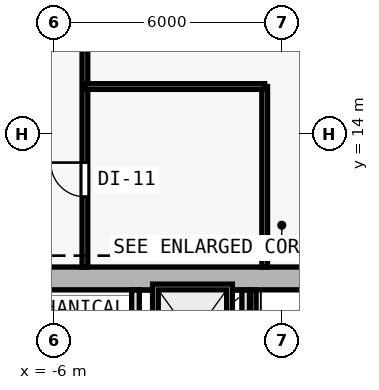
"""IFC4 building model, lengths in metres.
Left out: names, types, materials, properties, quantities, classifications, styles, units other than length and angle.
Written with IfcOpenShell. Run it as: python <this file> out.ifc"""

import sys

from ifc_helpers import new_model, si_unit, direction, frame, frame_2d, origin, place, context, subcontext, project, spatial, rectangle, extrude, element, fill, save


model = new_model("IFC4")
c1 = context("Model", 3, precision=1e-05, world=origin(), true_north=direction((0.0, 1.0)))
c2 = subcontext(c1, "Body", "Model", "MODEL_VIEW")
j1 = project(units=[si_unit("LENGTHUNIT", "METRE"), si_unit("PLANEANGLEUNIT", "RADIAN")], contexts=[c1])
p1 = place(None, origin())
s1 = spatial("IfcSite", under=j1, at=p1, CompositionType="ELEMENT")
p2 = place(p1, origin())
s2 = spatial("IfcBuilding", under=s1, at=p2, CompositionType="ELEMENT")
p3 = place(p2, frame((0.0, 0.0, 17.6)))
s3 = spatial("IfcBuildingStorey", under=s2, at=p3, CompositionType="ELEMENT", Elevation=17.6)
p4 = place(p3, frame((8.0, 10.2, 0.0), z_axis=(0.0, 0.0, 1.0), x_axis=(-1.0, 0.0, 0.0)))
e1 = element("IfcWall", 1, at=p4, inside=s3, PredefinedType="SHEAR", context=c2, shape_type="SweptSolid", body=[
    extrude(rectangle(XDim=16.0, YDim=0.6, at=frame_2d((8.0, 0.0))), origin(), (0.0, 0.0, 1.0), 3.88),
])
p5 = place(p4, frame((4.45, 0.0, 0.0)))
e2 = element("IfcOpeningElement", 2, at=p5, cuts=e1, PredefinedType="OPENING", context=c2, shape_type="SweptSolid", body=[
    extrude(rectangle(XDim=1.1, YDim=2.15, at=frame_2d((0.55, 1.075))), frame((0.0, 0.31, 0.0), z_axis=(0.0, -1.0, 0.0), x_axis=(1.0, 0.0, 0.0)), (0.0, 0.0, 1.0), 0.62),
])
p6 = place(p3, frame((-3.85, 1.35, 0.0), z_axis=(0.0, 0.0, 1.0), x_axis=(0.0, 1.0, 0.0)))
e3 = element("IfcWall", 3, at=p6, inside=s3, PredefinedType="SOLIDWALL", context=c2, shape_type="SweptSolid", body=[
    extrude(rectangle(XDim=8.545, YDim=0.2, at=frame_2d((4.272, 0.0))), origin(), (0.0, 0.0, 1.0), 3.88),
])
p7 = place(p6, frame((1.5, 0.0, 0.0)))
e4 = element("IfcOpeningElement", 4, at=p7, cuts=e3, PredefinedType="OPENING", context=c2, shape_type="SweptSolid", body=[
    extrude(rectangle(XDim=1.0, YDim=2.15, at=frame_2d((0.5, 1.075))), frame((0.0, 0.11, 0.0), z_axis=(0.0, -1.0, 0.0), x_axis=(1.0, 0.0, 0.0)), (0.0, 0.0, 1.0), 0.22),
])
p8 = place(p6, frame((3.18, 0.0, 0.0)))
e5 = element("IfcOpeningElement", 5, at=p8, cuts=e3, PredefinedType="OPENING", context=c2, shape_type="SweptSolid", body=[
    extrude(rectangle(XDim=1.0, YDim=2.15, at=frame_2d((0.5, 1.075))), frame((0.0, 0.11, 0.0), z_axis=(0.0, -1.0, 0.0), x_axis=(1.0, 0.0, 0.0)), (0.0, 0.0, 1.0), 0.22),
])
p9 = place(p3, frame((-0.95, 7.38, 0.0), z_axis=(0.0, 0.0, 1.0), x_axis=(0.0, 1.0, 0.0)))
e6 = element("IfcWall", 6, at=p9, inside=s3, PredefinedType="SOLIDWALL", context=c2, shape_type="SweptSolid", body=[
    extrude(rectangle(XDim=2.515, YDim=0.2, at=frame_2d((1.258, 0.0))), origin(), (0.0, 0.0, 1.0), 3.88),
])
p10 = place(p3, frame((-0.75, 5.92, 0.0), z_axis=(0.0, 0.0, 1.0), x_axis=(0.0, 1.0, 0.0)))
e7 = element("IfcWall", 7, at=p10, inside=s3, PredefinedType="PARTITIONING", context=c2, shape_type="SweptSolid", body=[
    extrude(rectangle(XDim=3.975, YDim=0.15, at=frame_2d((1.988, 0.0))), origin(), (0.0, 0.0, 1.0), 3.88),
])
p11 = place(p3, frame((-5.18, 10.5, 0.0), z_axis=(0.0, 0.0, 1.0), x_axis=(0.0, 1.0, 0.0)))
e8 = element("IfcWall", 8, at=p11, inside=s3, PredefinedType="PARTITIONING", context=c2, shape_type="SweptSolid", body=[
    extrude(rectangle(XDim=7.78, YDim=0.15, at=frame_2d((3.89, 0.0))), origin(), (0.0, 0.0, 1.0), 3.88),
])
p12 = place(p11, frame((1.849, 0.0, 0.0)))
e9 = element("IfcOpeningElement", 9, at=p12, cuts=e8, PredefinedType="OPENING", context=c2, shape_type="SweptSolid", body=[
    extrude(rectangle(XDim=0.9, YDim=2.1, at=frame_2d((0.45, 1.05))), frame((0.0, 0.085, 0.0), z_axis=(0.0, -1.0, 0.0), x_axis=(1.0, 0.0, 0.0)), (0.0, 0.0, 1.0), 0.17),
])
p13 = place(p3, frame((-0.45, 10.5, 0.0), z_axis=(0.0, 0.0, 1.0), x_axis=(0.0, 1.0, 0.0)))
e10 = element("IfcWall", 10, at=p13, inside=s3, PredefinedType="PARTITIONING", context=c2, shape_type="SweptSolid", body=[
    extrude(rectangle(XDim=4.75, YDim=0.15, at=frame_2d((2.375, 0.0))), origin(), (0.0, 0.0, 1.0), 3.88),
])
p14 = place(p3, frame((-5.18, 15.25, 0.0), z_axis=(0.0, 0.0, 1.0), x_axis=(1.0, 0.0, 0.0)))
e11 = element("IfcWall", 11, at=p14, inside=s3, PredefinedType="PARTITIONING", context=c2, shape_type="SweptSolid", body=[
    extrude(rectangle(XDim=4.73, YDim=0.15, at=frame_2d((2.365, 0.0))), origin(), (0.0, 0.0, 1.0), 3.88),
])
p15 = place(p12, origin())
e12 = element("IfcDoor", 12, at=p15, inside=s3, OperationType="SINGLE_SWING_RIGHT", PredefinedType="DOOR", context=c2, shape_type="SweptSolid", body=[
    extrude(rectangle(XDim=0.9, YDim=2.1, at=frame_2d((0.45, 1.05))), frame((0.0, 0.025, 0.0), z_axis=(0.0, -1.0, 0.0), x_axis=(1.0, 0.0, 0.0)), (0.0, 0.0, 1.0), 0.05),
])
fill(e9, e12)
save(model, sys.argv[1])
